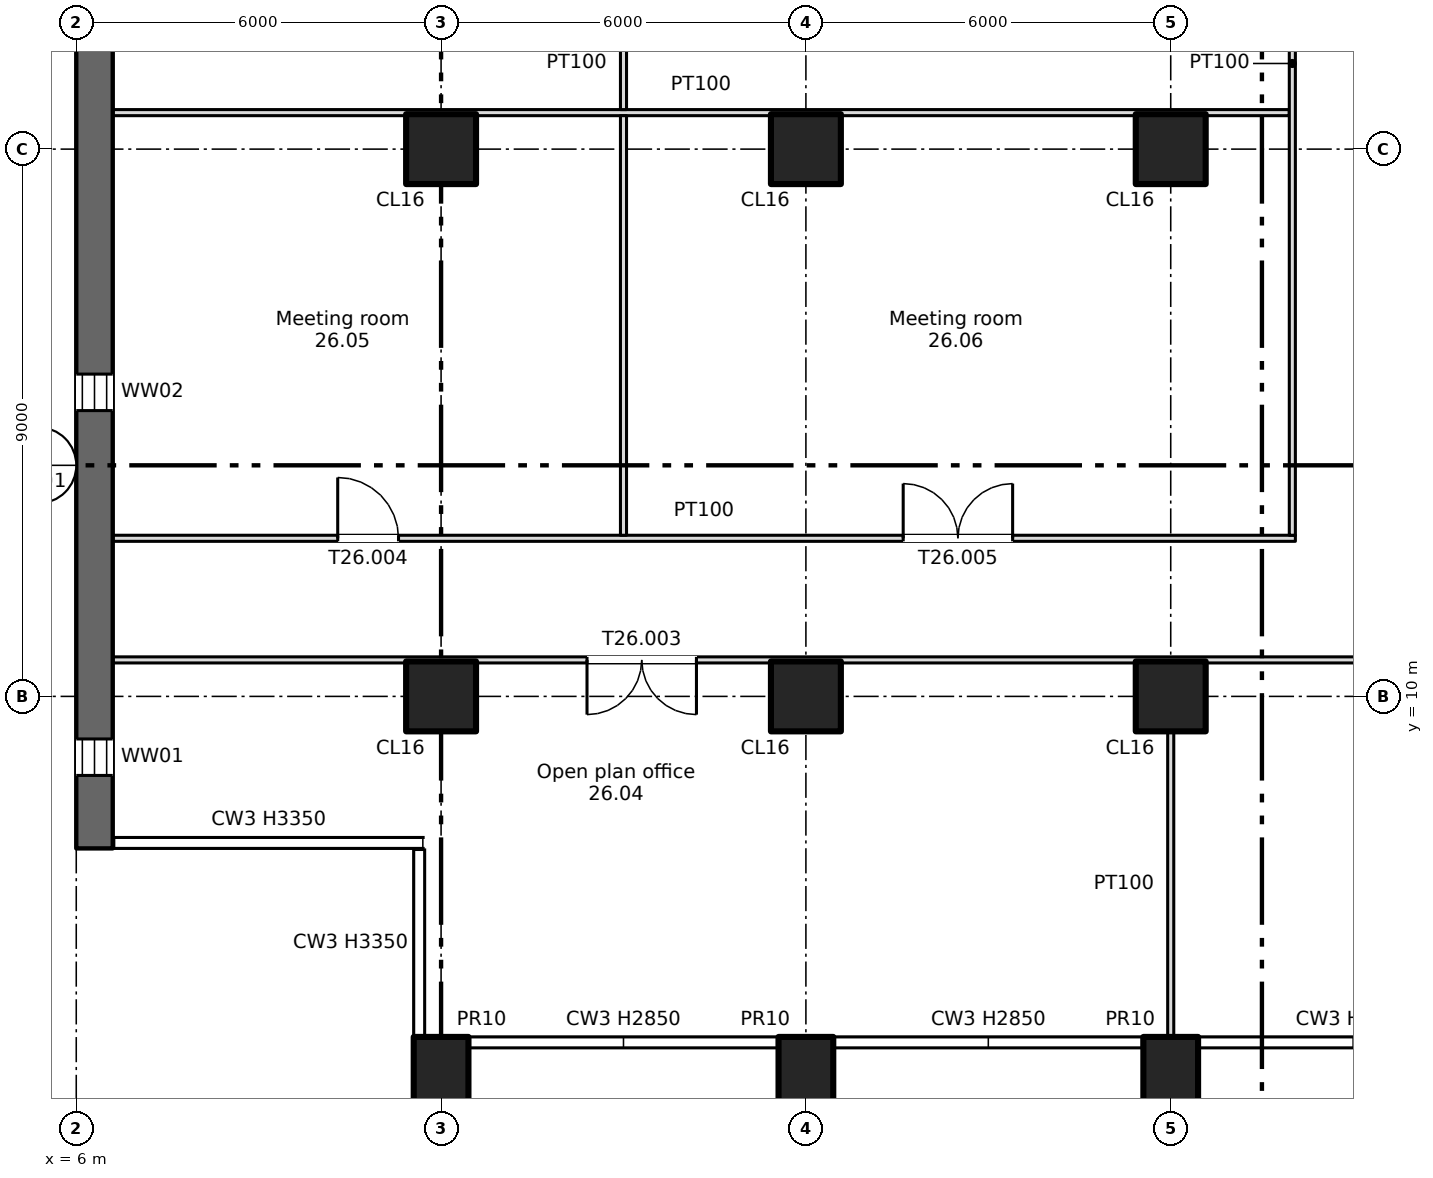
"""IFC4 building model, lengths in metres.
Left out: names, types, materials, properties, quantities, classifications, styles, units other than length and angle.
Written with IfcOpenShell. Run it as: python <this file> out.ifc"""

import sys

from ifc_helpers import new_model, si_unit, direction, frame, frame_2d, origin, origin_2d, place, context, subcontext, project, spatial, rectangle, extrude, element, fill, save


model = new_model("IFC4")
c1 = context("Model", 3, precision=1e-05, world=origin(), true_north=direction((0.0, 1.0)))
c2 = subcontext(c1, "Body", "Model", "MODEL_VIEW")
j1 = project(units=[si_unit("LENGTHUNIT", "METRE"), si_unit("PLANEANGLEUNIT", "RADIAN")], contexts=[c1])
p1 = place(None, origin())
s1 = spatial("IfcSite", under=j1, at=p1, CompositionType="ELEMENT")
p2 = place(p1, origin())
s2 = spatial("IfcBuilding", under=s1, at=p2, CompositionType="ELEMENT")
p3 = place(p2, frame((0.0, 0.0, 181.75)))
s3 = spatial("IfcBuildingStorey", under=s2, at=p3, CompositionType="ELEMENT", Elevation=181.75)
for number, where, z_axis, x_axis in (
    (1, (12.0, 3.7, -0.4), (0.0, 0.0, 1.0), (1.0, 0.0, 0.0)),
    (2, (18.0, 3.7, -0.4), (0.0, 0.0, 1.0), (1.0, 0.0, 0.0)),
    (3, (24.0, 3.7, -0.4), (0.0, 0.0, 1.0), (1.0, 0.0, 0.0)),
):
    element("IfcColumn", number, at=place(p3, frame(where, z_axis=z_axis, x_axis=x_axis)), inside=s3, PredefinedType="COLUMN", context=c2, shape_type="SweptSolid", body=[
        extrude(rectangle(XDim=0.9, YDim=1.4, at=origin_2d()), origin(), (0.0, 0.0, 1.0), 3.75),
    ])
for number, where, z_axis, x_axis in (
    (4, (12.0, 10.0, 0.0), (0.0, 0.0, 1.0), (1.0, 0.0, 0.0)),
    (5, (12.0, 19.0, 0.0), (0.0, 0.0, 1.0), (1.0, 0.0, 0.0)),
    (6, (18.0, 10.0, 0.0), (0.0, 0.0, 1.0), (1.0, 0.0, 0.0)),
    (7, (18.0, 19.0, 0.0), (0.0, 0.0, 1.0), (1.0, 0.0, 0.0)),
    (8, (24.0, 10.0, 0.0), (0.0, 0.0, 1.0), (1.0, 0.0, 0.0)),
    (9, (24.0, 19.0, 0.0), (0.0, 0.0, 1.0), (1.0, 0.0, 0.0)),
):
    element("IfcColumn", number, at=place(p3, frame(where, z_axis=z_axis, x_axis=x_axis)), inside=s3, PredefinedType="COLUMN", context=c2, shape_type="SweptSolid", body=[
        extrude(rectangle(XDim=1.15, YDim=1.15, at=origin_2d()), origin(), (0.0, 0.0, 1.0), 3.35),
    ])
p4 = place(p3, frame((6.3, 7.5, 0.0), z_axis=(0.0, 0.0, 1.0), x_axis=(0.0, 1.0, 0.0)))
e10 = element("IfcWall", 10, at=p4, inside=s3, PredefinedType="SHEAR", context=c2, shape_type="SweptSolid", body=[
    extrude(rectangle(XDim=34.0, YDim=0.6, at=frame_2d((17.0, 0.0))), origin(), (0.0, 0.0, 1.0), 3.35),
])
p5 = place(p4, frame((1.2, 0.0, 0.6)))
e11 = element("IfcOpeningElement", 11, at=p5, cuts=e10, PredefinedType="OPENING", context=c2, shape_type="SweptSolid", body=[
    extrude(rectangle(XDim=0.6, YDim=2.4, at=frame_2d((0.3, 1.2))), frame((0.0, 0.31, 0.0), z_axis=(0.0, -1.0, 0.0), x_axis=(1.0, 0.0, 0.0)), (0.0, 0.0, 1.0), 0.62),
])
p6 = place(p4, frame((7.2, 0.0, 0.6)))
e12 = element("IfcOpeningElement", 12, at=p6, cuts=e10, PredefinedType="OPENING", context=c2, shape_type="SweptSolid", body=[
    extrude(rectangle(XDim=0.6, YDim=2.4, at=frame_2d((0.3, 1.2))), frame((0.0, 0.31, 0.0), z_axis=(0.0, -1.0, 0.0), x_axis=(1.0, 0.0, 0.0)), (0.0, 0.0, 1.0), 0.62),
])
p7 = place(p4, frame((13.2, 0.0, 0.6)))
e13 = element("IfcOpeningElement", 13, at=p7, cuts=e10, PredefinedType="OPENING", context=c2, shape_type="SweptSolid", body=[
    extrude(rectangle(XDim=0.6, YDim=2.4, at=frame_2d((0.3, 1.2))), frame((0.0, 0.31, 0.0), z_axis=(0.0, -1.0, 0.0), x_axis=(1.0, 0.0, 0.0)), (0.0, 0.0, 1.0), 0.62),
])
p8 = place(p4, frame((19.2, 0.0, 0.6)))
e14 = element("IfcOpeningElement", 14, at=p8, cuts=e10, PredefinedType="OPENING", context=c2, shape_type="SweptSolid", body=[
    extrude(rectangle(XDim=0.6, YDim=2.4, at=frame_2d((0.3, 1.2))), frame((0.0, 0.31, 0.0), z_axis=(0.0, -1.0, 0.0), x_axis=(1.0, 0.0, 0.0)), (0.0, 0.0, 1.0), 0.62),
])
p9 = place(p3, frame((6.6, 10.6, 0.0), z_axis=(0.0, 0.0, 1.0), x_axis=(1.0, 0.0, 0.0)))
e15 = element("IfcWall", 15, at=p9, inside=s3, PredefinedType="PARTITIONING", context=c2, shape_type="SweptSolid", body=[
    extrude(rectangle(XDim=64.8, YDim=0.1, at=frame_2d((32.4, 0.0))), origin(), (0.0, 0.0, 1.0), 3.35),
])
p10 = place(p9, frame((30.0, 0.0, 0.0)))
e16 = element("IfcOpeningElement", 16, at=p10, cuts=e15, PredefinedType="OPENING", context=c2, shape_type="SweptSolid", body=[
    extrude(rectangle(XDim=1.8, YDim=2.1, at=frame_2d((0.9, 1.05))), frame((0.0, 0.06, 0.0), z_axis=(0.0, -1.0, 0.0), x_axis=(1.0, 0.0, 0.0)), (0.0, 0.0, 1.0), 0.12),
])
p11 = place(p9, frame((50.95, 0.0, 0.0)))
e17 = element("IfcOpeningElement", 17, at=p11, cuts=e15, PredefinedType="OPENING", context=c2, shape_type="SweptSolid", body=[
    extrude(rectangle(XDim=1.8, YDim=2.1, at=frame_2d((0.9, 1.05))), frame((0.0, 0.06, 0.0), z_axis=(0.0, -1.0, 0.0), x_axis=(1.0, 0.0, 0.0)), (0.0, 0.0, 1.0), 0.12),
])
p12 = place(p9, frame((7.8, 0.0, 0.0)))
e18 = element("IfcOpeningElement", 18, at=p12, cuts=e15, PredefinedType="OPENING", context=c2, shape_type="SweptSolid", body=[
    extrude(rectangle(XDim=1.8, YDim=2.1, at=frame_2d((0.9, 1.05))), frame((0.0, 0.06, 0.0), z_axis=(0.0, -1.0, 0.0), x_axis=(1.0, 0.0, 0.0)), (0.0, 0.0, 1.0), 0.12),
])
p13 = place(p3, frame((6.6, 12.6, 0.0), z_axis=(0.0, 0.0, 1.0), x_axis=(1.0, 0.0, 0.0)))
e19 = element("IfcWall", 19, at=p13, inside=s3, PredefinedType="PARTITIONING", context=c2, shape_type="SweptSolid", body=[
    extrude(rectangle(XDim=19.45, YDim=0.1, at=frame_2d((9.725, 0.0))), origin(), (0.0, 0.0, 1.0), 3.35),
])
p14 = place(p13, frame((3.7, 0.0, 0.0)))
e20 = element("IfcOpeningElement", 20, at=p14, cuts=e19, PredefinedType="OPENING", context=c2, shape_type="SweptSolid", body=[
    extrude(rectangle(XDim=1.0, YDim=2.1, at=frame_2d((0.5, 1.05))), frame((0.0, 0.06, 0.0), z_axis=(0.0, -1.0, 0.0), x_axis=(1.0, 0.0, 0.0)), (0.0, 0.0, 1.0), 0.12),
])
p15 = place(p13, frame((13.0, 0.0, 0.0)))
e21 = element("IfcOpeningElement", 21, at=p15, cuts=e19, PredefinedType="OPENING", context=c2, shape_type="SweptSolid", body=[
    extrude(rectangle(XDim=1.8, YDim=2.1, at=frame_2d((0.9, 1.05))), frame((0.0, 0.06, 0.0), z_axis=(0.0, -1.0, 0.0), x_axis=(1.0, 0.0, 0.0)), (0.0, 0.0, 1.0), 0.12),
])
p16 = place(p3, frame((6.6, 19.6, 0.0), z_axis=(0.0, 0.0, 1.0), x_axis=(1.0, 0.0, 0.0)))
e22 = element("IfcWall", 22, at=p16, inside=s3, PredefinedType="PARTITIONING", context=c2, shape_type="SweptSolid", body=[
    extrude(rectangle(XDim=19.35, YDim=0.1, at=frame_2d((9.675, 0.0))), origin(), (0.0, 0.0, 1.0), 3.35),
])
p17 = place(p3, frame((15.0, 12.65, 0.0), z_axis=(0.0, 0.0, 1.0), x_axis=(0.0, 1.0, 0.0)))
e23 = element("IfcWall", 23, at=p17, inside=s3, PredefinedType="PARTITIONING", context=c2, shape_type="SweptSolid", body=[
    extrude(rectangle(XDim=6.9, YDim=0.1, at=frame_2d((3.45, 0.0))), origin(), (0.0, 0.0, 1.0), 3.35),
])
p18 = place(p3, frame((15.0, 19.65, 0.0), z_axis=(0.0, 0.0, 1.0), x_axis=(0.0, 1.0, 0.0)))
e24 = element("IfcWall", 24, at=p18, inside=s3, PredefinedType="PARTITIONING", context=c2, shape_type="SweptSolid", body=[
    extrude(rectangle(XDim=6.3, YDim=0.1, at=frame_2d((3.15, 0.0))), origin(), (0.0, 0.0, 1.0), 3.35),
])
p19 = place(p3, frame((24.0, 4.4, 0.0), z_axis=(0.0, 0.0, 1.0), x_axis=(0.0, 1.0, 0.0)))
e25 = element("IfcWall", 25, at=p19, inside=s3, PredefinedType="PARTITIONING", context=c2, shape_type="SweptSolid", body=[
    extrude(rectangle(XDim=5.025, YDim=0.1, at=frame_2d((2.513, 0.0))), origin(), (0.0, 0.0, 1.0), 3.35),
])
p20 = place(p3, frame((26.0, 12.65, 0.0), z_axis=(0.0, 0.0, 1.0), x_axis=(0.0, 1.0, 0.0)))
e26 = element("IfcWall", 26, at=p20, inside=s3, PredefinedType="PARTITIONING", context=c2, shape_type="SweptSolid", body=[
    extrude(rectangle(XDim=13.3, YDim=0.1, at=frame_2d((6.65, 0.0))), origin(), (0.0, 0.0, 1.0), 3.35),
])
p21 = place(p5, origin())
e27 = element("IfcWindow", 27, at=p21, inside=s3, PartitioningType="SINGLE_PANEL", PredefinedType="WINDOW", context=c2, shape_type="SweptSolid", body=[
    extrude(rectangle(XDim=0.6, YDim=2.4, at=frame_2d((0.3, 1.2))), frame((0.0, 0.03, 0.0), z_axis=(0.0, -1.0, 0.0), x_axis=(1.0, 0.0, 0.0)), (0.0, 0.0, 1.0), 0.06),
])
fill(e11, e27)
p22 = place(p6, origin())
e28 = element("IfcWindow", 28, at=p22, inside=s3, PartitioningType="SINGLE_PANEL", PredefinedType="WINDOW", context=c2, shape_type="SweptSolid", body=[
    extrude(rectangle(XDim=0.6, YDim=2.4, at=frame_2d((0.3, 1.2))), frame((0.0, 0.03, 0.0), z_axis=(0.0, -1.0, 0.0), x_axis=(1.0, 0.0, 0.0)), (0.0, 0.0, 1.0), 0.06),
])
fill(e12, e28)
p23 = place(p12, origin())
e29 = element("IfcDoor", 29, at=p23, inside=s3, OperationType="DOUBLE_DOOR_SINGLE_SWING", PredefinedType="DOOR", context=c2, shape_type="SweptSolid", body=[
    extrude(rectangle(XDim=1.8, YDim=2.1, at=frame_2d((0.9, 1.05))), frame((0.0, 0.025, 0.0), z_axis=(0.0, -1.0, 0.0), x_axis=(1.0, 0.0, 0.0)), (0.0, 0.0, 1.0), 0.05),
])
fill(e18, e29)
p24 = place(p14, origin())
e30 = element("IfcDoor", 30, at=p24, inside=s3, OperationType="SINGLE_SWING_LEFT", PredefinedType="DOOR", context=c2, shape_type="SweptSolid", body=[
    extrude(rectangle(XDim=1.0, YDim=2.1, at=frame_2d((0.5, 1.05))), frame((0.0, 0.025, 0.0), z_axis=(0.0, -1.0, 0.0), x_axis=(1.0, 0.0, 0.0)), (0.0, 0.0, 1.0), 0.05),
])
fill(e20, e30)
p25 = place(p15, origin())
e31 = element("IfcDoor", 31, at=p25, inside=s3, OperationType="DOUBLE_DOOR_SINGLE_SWING", PredefinedType="DOOR", context=c2, shape_type="SweptSolid", body=[
    extrude(rectangle(XDim=1.8, YDim=2.1, at=frame_2d((0.9, 1.05))), frame((0.0, 0.025, 0.0), z_axis=(0.0, -1.0, 0.0), x_axis=(1.0, 0.0, 0.0)), (0.0, 0.0, 1.0), 0.05),
])
fill(e21, e31)
save(model, sys.argv[1])
